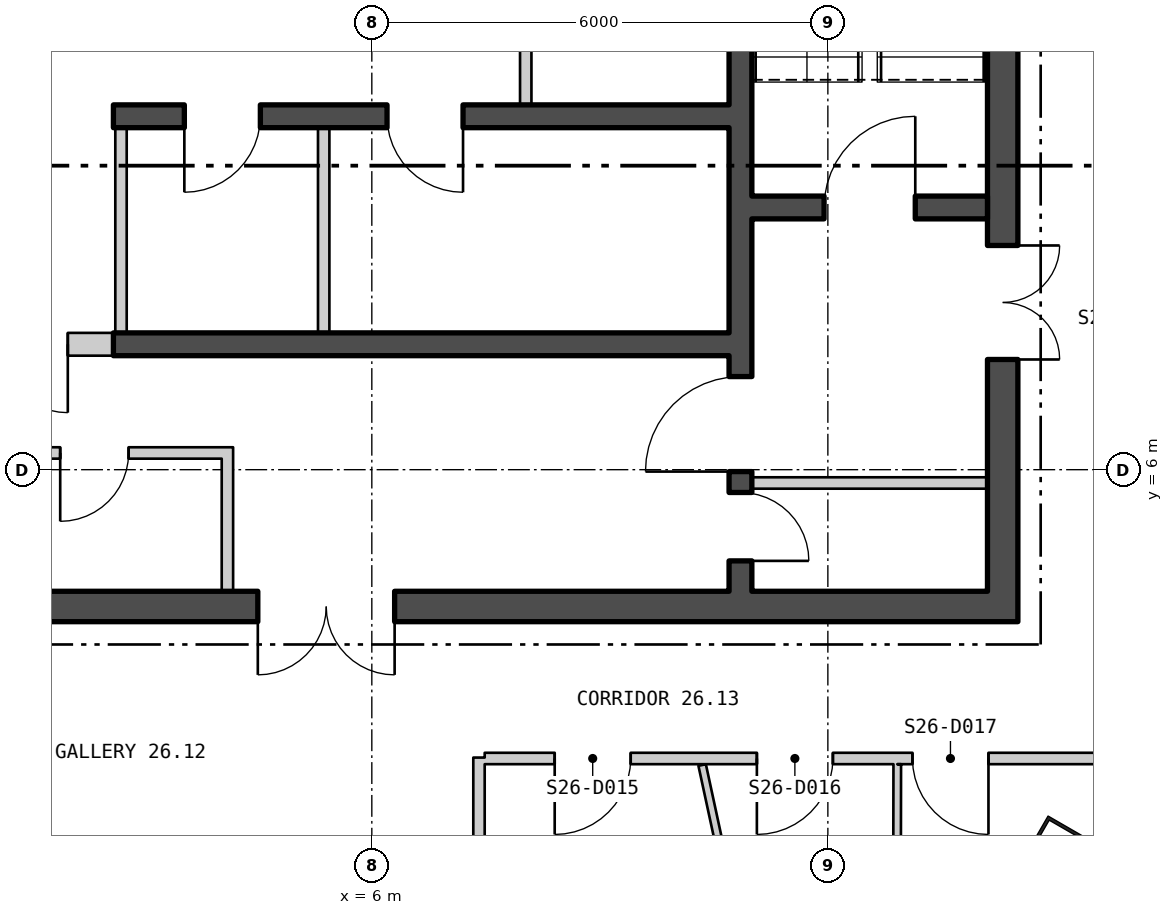
"""IFC4 building model, lengths in metres.
Left out: names, types, materials, properties, quantities, classifications, styles, units other than length and angle.
Written with IfcOpenShell. Run it as: python <this file> out.ifc"""

import sys

from ifc_helpers import new_model, si_unit, direction, frame, frame_2d, origin, origin_2d, place, context, subcontext, project, spatial, polyline, rectangle, hollow_rectangle, outline, extrude, element, fill, save


model = new_model("IFC4")
c1 = context("Model", 3, precision=1e-05, world=origin(), true_north=direction((0.0, 1.0)))
c2 = subcontext(c1, "Body", "Model", "MODEL_VIEW")
j1 = project(units=[si_unit("LENGTHUNIT", "METRE"), si_unit("PLANEANGLEUNIT", "RADIAN")], contexts=[c1])
p1 = place(None, origin())
s1 = spatial("IfcSite", under=j1, at=p1, CompositionType="ELEMENT")
p2 = place(p1, origin())
s2 = spatial("IfcBuilding", under=s1, at=p2, CompositionType="ELEMENT")
p3 = place(p2, frame((0.0, 0.0, 329.4)))
s3 = spatial("IfcBuildingStorey", under=s2, at=p3, CompositionType="ELEMENT", Elevation=329.4)
p4 = place(p3, frame((15.088, 1.073, 0.0), z_axis=(0.0, 0.0, 1.0), x_axis=(0.5, 0.866025403784, 0.0)))
e1 = element("IfcColumn", 1, at=p4, inside=s3, PredefinedType="COLUMN", context=c2, shape_type="SweptSolid", body=[
    extrude(hollow_rectangle(XDim=0.45, YDim=0.7, WallThickness=0.04, at=origin_2d()), origin(), (0.0, 0.0, 1.0), 4.2),
])
p5 = place(p3, frame((1.9, -22.92, -0.18), z_axis=(0.0, 0.0, 1.0), x_axis=(0.500000141277, 0.866025322218, 0.0)))
e2 = element("IfcWall", 2, at=p5, inside=s3, PredefinedType="SOLIDWALL", context=c2, shape_type="SweptSolid", body=[
    extrude(outline(polyline([(-0.13, -0.225), (45.86, -0.225), (45.6, 0.225), (0.13, 0.225), (-0.13, -0.225)])), origin(), (0.0, 0.0, 1.0), 3.98),
])
p6 = place(p5, frame((1.424, 0.0, 1.08)))
e3 = element("IfcOpeningElement", 3, at=p6, cuts=e2, PredefinedType="OPENING", context=c2, shape_type="SweptSolid", body=[
    extrude(rectangle(XDim=2.4, YDim=2.3, at=frame_2d((1.2, 1.15))), frame((0.0, 0.235, 0.0), z_axis=(0.0, -1.0, 0.0), x_axis=(1.0, 0.0, 0.0)), (0.0, 0.0, 1.0), 0.47),
])
p7 = place(p5, frame((5.892, 0.0, 1.08)))
e4 = element("IfcOpeningElement", 4, at=p7, cuts=e2, PredefinedType="OPENING", context=c2, shape_type="SweptSolid", body=[
    extrude(rectangle(XDim=2.4, YDim=2.3, at=frame_2d((1.2, 1.15))), frame((0.0, 0.235, 0.0), z_axis=(0.0, -1.0, 0.0), x_axis=(1.0, 0.0, 0.0)), (0.0, 0.0, 1.0), 0.47),
])
p8 = place(p5, frame((14.905, 0.0, 1.08)))
e5 = element("IfcOpeningElement", 5, at=p8, cuts=e2, PredefinedType="OPENING", context=c2, shape_type="SweptSolid", body=[
    extrude(rectangle(XDim=2.4, YDim=2.3, at=frame_2d((1.2, 1.15))), frame((0.0, 0.235, 0.0), z_axis=(0.0, -1.0, 0.0), x_axis=(1.0, 0.0, 0.0)), (0.0, 0.0, 1.0), 0.47),
])
p9 = place(p5, frame((19.412, 0.0, 1.08)))
e6 = element("IfcOpeningElement", 6, at=p9, cuts=e2, PredefinedType="OPENING", context=c2, shape_type="SweptSolid", body=[
    extrude(rectangle(XDim=2.4, YDim=2.3, at=frame_2d((1.2, 1.15))), frame((0.0, 0.235, 0.0), z_axis=(0.0, -1.0, 0.0), x_axis=(1.0, 0.0, 0.0)), (0.0, 0.0, 1.0), 0.47),
])
p10 = place(p5, frame((23.918, 0.0, 1.08)))
e7 = element("IfcOpeningElement", 7, at=p10, cuts=e2, PredefinedType="OPENING", context=c2, shape_type="SweptSolid", body=[
    extrude(rectangle(XDim=2.4, YDim=2.3, at=frame_2d((1.2, 1.15))), frame((0.0, 0.235, 0.0), z_axis=(0.0, -1.0, 0.0), x_axis=(1.0, 0.0, 0.0)), (0.0, 0.0, 1.0), 0.47),
])
p11 = place(p5, frame((32.932, 0.0, 1.08)))
e8 = element("IfcOpeningElement", 8, at=p11, cuts=e2, PredefinedType="OPENING", context=c2, shape_type="SweptSolid", body=[
    extrude(rectangle(XDim=2.4, YDim=2.3, at=frame_2d((1.2, 1.15))), frame((0.0, 0.235, 0.0), z_axis=(0.0, -1.0, 0.0), x_axis=(1.0, 0.0, 0.0)), (0.0, 0.0, 1.0), 0.47),
])
p12 = place(p5, frame((37.438, 0.0, 1.08)))
e9 = element("IfcOpeningElement", 9, at=p12, cuts=e2, PredefinedType="OPENING", context=c2, shape_type="SweptSolid", body=[
    extrude(rectangle(XDim=2.4, YDim=2.3, at=frame_2d((1.2, 1.15))), frame((0.0, 0.235, 0.0), z_axis=(0.0, -1.0, 0.0), x_axis=(1.0, 0.0, 0.0)), (0.0, 0.0, 1.0), 0.47),
])
p13 = place(p5, frame((41.907, 0.0, 1.08)))
e10 = element("IfcOpeningElement", 10, at=p13, cuts=e2, PredefinedType="OPENING", context=c2, shape_type="SweptSolid", body=[
    extrude(rectangle(XDim=2.4, YDim=2.3, at=frame_2d((1.2, 1.15))), frame((0.0, 0.235, 0.0), z_axis=(0.0, -1.0, 0.0), x_axis=(1.0, 0.0, 0.0)), (0.0, 0.0, 1.0), 0.47),
])
p14 = place(p3, frame((-14.5, 4.2, 0.0), z_axis=(0.0, 0.0, 1.0), x_axis=(1.0, 0.0, 0.0)))
e11 = element("IfcWall", 11, at=p14, inside=s3, PredefinedType="SHEAR", context=c2, shape_type="SweptSolid", body=[
    extrude(rectangle(XDim=29.0, YDim=0.4, at=frame_2d((14.5, 0.0))), origin(), (0.0, 0.0, 1.0), 4.0),
])
p15 = place(p14, frame((9.0, 0.0, 0.0)))
e12 = element("IfcOpeningElement", 12, at=p15, cuts=e11, PredefinedType="OPENING", context=c2, shape_type="SweptSolid", body=[
    extrude(rectangle(XDim=1.8, YDim=2.4, at=frame_2d((0.9, 1.2))), frame((0.0, 0.21, 0.0), z_axis=(0.0, -1.0, 0.0), x_axis=(1.0, 0.0, 0.0)), (0.0, 0.0, 1.0), 0.42),
])
p16 = place(p14, frame((19.0, 0.0, 0.0)))
e13 = element("IfcOpeningElement", 13, at=p16, cuts=e11, PredefinedType="OPENING", context=c2, shape_type="SweptSolid", body=[
    extrude(rectangle(XDim=1.8, YDim=2.4, at=frame_2d((0.9, 1.2))), frame((0.0, 0.21, 0.0), z_axis=(0.0, -1.0, 0.0), x_axis=(1.0, 0.0, 0.0)), (0.0, 0.0, 1.0), 0.42),
])
p17 = place(p3, frame((14.3, 4.4, 0.0), z_axis=(0.0, 0.0, 1.0), x_axis=(0.0, 1.0, 0.0)))
e14 = element("IfcWall", 14, at=p17, inside=s3, PredefinedType="SHEAR", context=c2, shape_type="SweptSolid", body=[
    extrude(rectangle(XDim=13.2, YDim=0.4, at=frame_2d((6.6, 0.0))), origin(), (0.0, 0.0, 1.0), 4.0),
])
p18 = place(p17, frame((3.05, 0.0, 0.0)))
e15 = element("IfcOpeningElement", 15, at=p18, cuts=e14, PredefinedType="OPENING", context=c2, shape_type="SweptSolid", body=[
    extrude(rectangle(XDim=1.5, YDim=2.1, at=frame_2d((0.75, 1.05))), frame((0.0, 0.21, 0.0), z_axis=(0.0, -1.0, 0.0), x_axis=(1.0, 0.0, 0.0)), (0.0, 0.0, 1.0), 0.42),
])
p19 = place(p3, frame((10.85, 4.4, 0.0), z_axis=(0.0, 0.0, 1.0), x_axis=(0.0, 1.0, 0.0)))
e16 = element("IfcWall", 16, at=p19, inside=s3, PredefinedType="SHEAR", context=c2, shape_type="SweptSolid", body=[
    extrude(rectangle(XDim=13.2, YDim=0.3, at=frame_2d((6.6, 0.0))), origin(), (0.0, 0.0, 1.0), 4.0),
])
p20 = place(p19, frame((1.575, 0.0, 0.0)))
e17 = element("IfcOpeningElement", 17, at=p20, cuts=e16, PredefinedType="OPENING", context=c2, shape_type="SweptSolid", body=[
    extrude(rectangle(XDim=1.25, YDim=2.1, at=frame_2d((0.625, 1.05))), frame((0.0, 0.16, 0.0), z_axis=(0.0, -1.0, 0.0), x_axis=(1.0, 0.0, 0.0)), (0.0, 0.0, 1.0), 0.32),
])
p21 = place(p19, frame((0.4, 0.0, 0.0)))
e18 = element("IfcOpeningElement", 18, at=p21, cuts=e16, PredefinedType="OPENING", context=c2, shape_type="SweptSolid", body=[
    extrude(rectangle(XDim=0.9, YDim=2.1, at=frame_2d((0.45, 1.05))), frame((0.0, 0.16, 0.0), z_axis=(0.0, -1.0, 0.0), x_axis=(1.0, 0.0, 0.0)), (0.0, 0.0, 1.0), 0.32),
])
p22 = place(p3, frame((11.0, 9.45, 0.0), z_axis=(0.0, 0.0, 1.0), x_axis=(1.0, 0.0, 0.0)))
e19 = element("IfcWall", 19, at=p22, inside=s3, PredefinedType="SHEAR", context=c2, shape_type="SweptSolid", body=[
    extrude(rectangle(XDim=3.1, YDim=0.3, at=frame_2d((1.55, 0.0))), origin(), (0.0, 0.0, 1.0), 4.0),
])
p23 = place(p22, frame((0.95, 0.0, 0.0)))
e20 = element("IfcOpeningElement", 20, at=p23, cuts=e19, PredefinedType="OPENING", context=c2, shape_type="SweptSolid", body=[
    extrude(rectangle(XDim=1.2, YDim=2.1, at=frame_2d((0.6, 1.05))), frame((0.0, 0.16, 0.0), z_axis=(0.0, -1.0, 0.0), x_axis=(1.0, 0.0, 0.0)), (0.0, 0.0, 1.0), 0.32),
])
p24 = place(p3, frame((2.6, 10.65, 0.0), z_axis=(0.0, 0.0, 1.0), x_axis=(1.0, 0.0, 0.0)))
e21 = element("IfcWall", 21, at=p24, inside=s3, PredefinedType="SHEAR", context=c2, shape_type="SweptSolid", body=[
    extrude(rectangle(XDim=8.1, YDim=0.3, at=frame_2d((4.05, 0.0))), origin(), (0.0, 0.0, 1.0), 4.0),
])
p25 = place(p24, frame((0.933, 0.0, 0.0)))
e22 = element("IfcOpeningElement", 22, at=p25, cuts=e21, PredefinedType="OPENING", context=c2, shape_type="SweptSolid", body=[
    extrude(rectangle(XDim=1.0, YDim=2.1, at=frame_2d((0.5, 1.05))), frame((0.0, 0.16, 0.0), z_axis=(0.0, -1.0, 0.0), x_axis=(1.0, 0.0, 0.0)), (0.0, 0.0, 1.0), 0.32),
])
p26 = place(p24, frame((3.6, 0.0, 0.0)))
e23 = element("IfcOpeningElement", 23, at=p26, cuts=e21, PredefinedType="OPENING", context=c2, shape_type="SweptSolid", body=[
    extrude(rectangle(XDim=1.0, YDim=2.1, at=frame_2d((0.5, 1.05))), frame((0.0, 0.16, 0.0), z_axis=(0.0, -1.0, 0.0), x_axis=(1.0, 0.0, 0.0)), (0.0, 0.0, 1.0), 0.32),
])
p27 = place(p3, frame((2.6, 7.65, 0.0), z_axis=(0.0, 0.0, 1.0), x_axis=(1.0, 0.0, 0.0)))
e24 = element("IfcWall", 24, at=p27, inside=s3, PredefinedType="SHEAR", context=c2, shape_type="SweptSolid", body=[
    extrude(rectangle(XDim=8.1, YDim=0.3, at=frame_2d((4.05, 0.0))), origin(), (0.0, 0.0, 1.0), 4.0),
])
for number, where, z_axis, x_axis in (
    (25, (2.7, 7.8, 0.0), (0.0, 0.0, 1.0), (0.0, 1.0, 0.0)),
    (26, (5.367, 7.8, 0.0), (0.0, 0.0, 1.0), (0.0, 1.0, 0.0)),
):
    element("IfcWall", number, at=place(p3, frame(where, z_axis=z_axis, x_axis=x_axis)), inside=s3, PredefinedType="PARTITIONING", context=c2, shape_type="SweptSolid", body=[
        extrude(rectangle(XDim=2.7, YDim=0.15, at=frame_2d((1.35, 0.0))), origin(), (0.0, 0.0, 1.0), 4.0),
    ])
p28 = place(p3, frame((8.025, 10.8, 0.0), z_axis=(0.0, 0.0, 1.0), x_axis=(0.0, 1.0, 0.0)))
e27 = element("IfcWall", 27, at=p28, inside=s3, PredefinedType="PARTITIONING", context=c2, shape_type="SweptSolid", body=[
    extrude(rectangle(XDim=3.6, YDim=0.15, at=frame_2d((1.8, 0.0))), origin(), (0.0, 0.0, 1.0), 4.0),
])
p29 = place(p28, frame((1.175, 0.0, 0.0)))
e28 = element("IfcOpeningElement", 28, at=p29, cuts=e27, PredefinedType="OPENING", context=c2, shape_type="SweptSolid", body=[
    extrude(rectangle(XDim=1.25, YDim=2.1, at=frame_2d((0.625, 1.05))), frame((0.0, 0.085, 0.0), z_axis=(0.0, -1.0, 0.0), x_axis=(1.0, 0.0, 0.0)), (0.0, 0.0, 1.0), 0.17),
])
p30 = place(p3, frame((11.0, 5.825, 0.0), z_axis=(0.0, 0.0, 1.0), x_axis=(1.0, 0.0, 0.0)))
e29 = element("IfcWall", 29, at=p30, inside=s3, PredefinedType="PARTITIONING", context=c2, shape_type="SweptSolid", body=[
    extrude(rectangle(XDim=3.1, YDim=0.15, at=frame_2d((1.55, 0.0))), origin(), (0.0, 0.0, 1.0), 4.0),
])
p31 = place(p3, frame((4.1, 4.4, 0.0), z_axis=(0.0, 0.0, 1.0), x_axis=(0.0, 1.0, 0.0)))
e30 = element("IfcWall", 30, at=p31, inside=s3, PredefinedType="PARTITIONING", context=c2, shape_type="SweptSolid", body=[
    extrude(rectangle(XDim=1.895, YDim=0.15, at=frame_2d((0.948, 0.0))), origin(), (0.0, 0.0, 1.0), 4.0),
])
p32 = place(p3, frame((0.675, 6.22, 0.0), z_axis=(0.0, 0.0, 1.0), x_axis=(1.0, 0.0, 0.0)))
e31 = element("IfcWall", 31, at=p32, inside=s3, PredefinedType="PARTITIONING", context=c2, shape_type="SweptSolid", body=[
    extrude(rectangle(XDim=3.35, YDim=0.15, at=frame_2d((1.675, 0.0))), origin(), (0.0, 0.0, 1.0), 4.0),
])
p33 = place(p32, frame((1.225, 0.0, 0.0)))
e32 = element("IfcOpeningElement", 32, at=p33, cuts=e31, PredefinedType="OPENING", context=c2, shape_type="SweptSolid", body=[
    extrude(rectangle(XDim=0.9, YDim=2.1, at=frame_2d((0.45, 1.05))), frame((0.0, 0.085, 0.0), z_axis=(0.0, -1.0, 0.0), x_axis=(1.0, 0.0, 0.0)), (0.0, 0.0, 1.0), 0.17),
])
p34 = place(p3, frame((-0.4, 7.65, 0.0), z_axis=(0.0, 0.0, 1.0), x_axis=(1.0, 0.0, 0.0)))
e33 = element("IfcWall", 33, at=p34, inside=s3, PredefinedType="PARTITIONING", context=c2, shape_type="SweptSolid", body=[
    extrude(rectangle(XDim=3.0, YDim=0.3, at=frame_2d((1.5, 0.0))), origin(), (0.0, 0.0, 1.0), 4.0),
])
p35 = place(p34, frame((0.6, 0.0, 0.0)))
e34 = element("IfcOpeningElement", 34, at=p35, cuts=e33, PredefinedType="OPENING", context=c2, shape_type="SweptSolid", body=[
    extrude(rectangle(XDim=1.8, YDim=2.4, at=frame_2d((0.9, 1.2))), frame((0.0, 0.16, 0.0), z_axis=(0.0, -1.0, 0.0), x_axis=(1.0, 0.0, 0.0)), (0.0, 0.0, 1.0), 0.32),
])
p36 = place(p3, frame((7.41, -12.926, 0.0), z_axis=(0.0, 0.0, 1.0), x_axis=(0.0, 1.0, 0.0)))
e35 = element("IfcWall", 35, at=p36, inside=s3, PredefinedType="PARTITIONING", context=c2, shape_type="SweptSolid", body=[
    extrude(rectangle(XDim=15.138, YDim=0.15, at=frame_2d((7.569, 0.0))), origin(), (0.0, 0.0, 1.0), 4.0),
])
p37 = place(p36, frame((3.512, 0.0, 0.0)))
e36 = element("IfcOpeningElement", 36, at=p37, cuts=e35, PredefinedType="OPENING", context=c2, shape_type="SweptSolid", body=[
    extrude(rectangle(XDim=1.0, YDim=2.1, at=frame_2d((0.5, 1.05))), frame((0.0, 0.085, 0.0), z_axis=(0.0, -1.0, 0.0), x_axis=(1.0, 0.0, 0.0)), (0.0, 0.0, 1.0), 0.17),
])
p38 = place(p36, frame((11.427, 0.0, 0.0)))
e37 = element("IfcOpeningElement", 37, at=p38, cuts=e35, PredefinedType="OPENING", context=c2, shape_type="SweptSolid", body=[
    extrude(rectangle(XDim=1.0, YDim=2.1, at=frame_2d((0.5, 1.05))), frame((0.0, 0.085, 0.0), z_axis=(0.0, -1.0, 0.0), x_axis=(1.0, 0.0, 0.0)), (0.0, 0.0, 1.0), 0.17),
])
p39 = place(p3, frame((7.485, 2.2, 0.0), z_axis=(0.0, 0.0, 1.0), x_axis=(1.0, 0.0, 0.0)))
e38 = element("IfcWall", 38, at=p39, inside=s3, PredefinedType="PARTITIONING", context=c2, shape_type="SweptSolid", body=[
    extrude(rectangle(XDim=8.658, YDim=0.15, at=frame_2d((4.329, 0.0))), origin(), (0.0, 0.0, 1.0), 4.0),
])
p40 = place(p39, frame((0.921, 0.0, 0.0)))
e39 = element("IfcOpeningElement", 39, at=p40, cuts=e38, PredefinedType="OPENING", context=c2, shape_type="SweptSolid", body=[
    extrude(rectangle(XDim=1.0, YDim=2.1, at=frame_2d((0.5, 1.05))), frame((0.0, 0.085, 0.0), z_axis=(0.0, -1.0, 0.0), x_axis=(1.0, 0.0, 0.0)), (0.0, 0.0, 1.0), 0.17),
])
p41 = place(p39, frame((3.581, 0.0, 0.0)))
e40 = element("IfcOpeningElement", 40, at=p41, cuts=e38, PredefinedType="OPENING", context=c2, shape_type="SweptSolid", body=[
    extrude(rectangle(XDim=1.0, YDim=2.1, at=frame_2d((0.5, 1.05))), frame((0.0, 0.085, 0.0), z_axis=(0.0, -1.0, 0.0), x_axis=(1.0, 0.0, 0.0)), (0.0, 0.0, 1.0), 0.17),
])
p42 = place(p39, frame((5.628, 0.0, 0.0)))
e41 = element("IfcOpeningElement", 41, at=p42, cuts=e38, PredefinedType="OPENING", context=c2, shape_type="SweptSolid", body=[
    extrude(rectangle(XDim=1.0, YDim=2.1, at=frame_2d((0.5, 1.05))), frame((0.0, 0.085, 0.0), z_axis=(0.0, -1.0, 0.0), x_axis=(1.0, 0.0, 0.0)), (0.0, 0.0, 1.0), 0.17),
])
p43 = place(p3, frame((10.346, 2.114, 0.0), z_axis=(0.0, 0.0, 1.0), x_axis=(0.211378111895, -0.977404365558, 0.0)))
e42 = element("IfcWall", 42, at=p43, inside=s3, PredefinedType="PARTITIONING", context=c2, shape_type="SweptSolid", body=[
    extrude(rectangle(XDim=3.988, YDim=0.1, at=frame_2d((1.994, 0.0))), origin(), (0.0, 0.0, 1.0), 4.0),
])
p44 = place(p3, frame((12.904, -2.73, 0.0), z_axis=(0.0, 0.0, 1.0), x_axis=(0.001853755826, 0.999998281793, 0.0)))
e43 = element("IfcWall", 43, at=p44, inside=s3, PredefinedType="PARTITIONING", context=c2, shape_type="SweptSolid", body=[
    extrude(rectangle(XDim=4.855, YDim=0.1, at=frame_2d((2.428, 0.0))), origin(), (0.0, 0.0, 1.0), 4.0),
])
p45 = place(p25, origin())
e44 = element("IfcDoor", 44, at=p45, inside=s3, OperationType="SINGLE_SWING_LEFT", PredefinedType="DOOR", context=c2, shape_type="SweptSolid", body=[
    extrude(rectangle(XDim=1.0, YDim=2.1, at=frame_2d((0.5, 1.05))), frame((0.0, 0.025, 0.0), z_axis=(0.0, -1.0, 0.0), x_axis=(1.0, 0.0, 0.0)), (0.0, 0.0, 1.0), 0.05),
])
fill(e22, e44)
p46 = place(p26, origin())
e45 = element("IfcDoor", 45, at=p46, inside=s3, OperationType="SINGLE_SWING_RIGHT", PredefinedType="DOOR", context=c2, shape_type="SweptSolid", body=[
    extrude(rectangle(XDim=1.0, YDim=2.1, at=frame_2d((0.5, 1.05))), frame((0.0, 0.025, 0.0), z_axis=(0.0, -1.0, 0.0), x_axis=(1.0, 0.0, 0.0)), (0.0, 0.0, 1.0), 0.05),
])
fill(e23, e45)
p47 = place(p23, origin())
e46 = element("IfcDoor", 46, at=p47, inside=s3, OperationType="SINGLE_SWING_LEFT", PredefinedType="DOOR", context=c2, shape_type="SweptSolid", body=[
    extrude(rectangle(XDim=1.2, YDim=2.1, at=frame_2d((0.6, 1.05))), frame((0.0, 0.025, 0.0), z_axis=(0.0, -1.0, 0.0), x_axis=(1.0, 0.0, 0.0)), (0.0, 0.0, 1.0), 0.05),
])
fill(e20, e46)
p48 = place(p20, origin())
e47 = element("IfcDoor", 47, at=p48, inside=s3, OperationType="SINGLE_SWING_RIGHT", PredefinedType="DOOR", context=c2, shape_type="SweptSolid", body=[
    extrude(rectangle(XDim=1.25, YDim=2.1, at=frame_2d((0.625, 1.05))), frame((0.0, 0.025, 0.0), z_axis=(0.0, -1.0, 0.0), x_axis=(1.0, 0.0, 0.0)), (0.0, 0.0, 1.0), 0.05),
])
fill(e17, e47)
p49 = place(p18, origin())
e48 = element("IfcDoor", 48, at=p49, inside=s3, OperationType="DOUBLE_DOOR_SINGLE_SWING", PredefinedType="DOOR", context=c2, shape_type="SweptSolid", body=[
    extrude(rectangle(XDim=1.5, YDim=2.1, at=frame_2d((0.75, 1.05))), frame((0.0, 0.025, 0.0), z_axis=(0.0, -1.0, 0.0), x_axis=(1.0, 0.0, 0.0)), (0.0, 0.0, 1.0), 0.05),
])
fill(e15, e48)
p50 = place(p21, origin())
e49 = element("IfcDoor", 49, at=p50, inside=s3, OperationType="SINGLE_SWING_LEFT", PredefinedType="DOOR", context=c2, shape_type="SweptSolid", body=[
    extrude(rectangle(XDim=0.9, YDim=2.1, at=frame_2d((0.45, 1.05))), frame((0.0, 0.025, 0.0), z_axis=(0.0, -1.0, 0.0), x_axis=(1.0, 0.0, 0.0)), (0.0, 0.0, 1.0), 0.05),
])
fill(e18, e49)
p51 = place(p33, origin())
e50 = element("IfcDoor", 50, at=p51, inside=s3, OperationType="SINGLE_SWING_LEFT", PredefinedType="DOOR", context=c2, shape_type="SweptSolid", body=[
    extrude(rectangle(XDim=0.9, YDim=2.1, at=frame_2d((0.45, 1.05))), frame((0.0, 0.025, 0.0), z_axis=(0.0, -1.0, 0.0), x_axis=(1.0, 0.0, 0.0)), (0.0, 0.0, 1.0), 0.05),
])
fill(e32, e50)
p52 = place(p35, origin())
e51 = element("IfcDoor", 51, at=p52, inside=s3, OperationType="DOUBLE_DOOR_SINGLE_SWING", PredefinedType="DOOR", context=c2, shape_type="SweptSolid", body=[
    extrude(rectangle(XDim=1.8, YDim=2.4, at=frame_2d((0.9, 1.2))), frame((0.0, 0.025, 0.0), z_axis=(0.0, -1.0, 0.0), x_axis=(1.0, 0.0, 0.0)), (0.0, 0.0, 1.0), 0.05),
])
fill(e34, e51)
p53 = place(p16, origin())
e52 = element("IfcDoor", 52, at=p53, inside=s3, OperationType="DOUBLE_DOOR_SINGLE_SWING", PredefinedType="DOOR", context=c2, shape_type="SweptSolid", body=[
    extrude(rectangle(XDim=1.8, YDim=2.4, at=frame_2d((0.9, 1.2))), frame((0.0, 0.025, 0.0), z_axis=(0.0, -1.0, 0.0), x_axis=(1.0, 0.0, 0.0)), (0.0, 0.0, 1.0), 0.05),
])
fill(e13, e52)
p54 = place(p40, origin())
e53 = element("IfcDoor", 53, at=p54, inside=s3, OperationType="SINGLE_SWING_LEFT", PredefinedType="DOOR", context=c2, shape_type="SweptSolid", body=[
    extrude(rectangle(XDim=1.0, YDim=2.1, at=frame_2d((0.5, 1.05))), frame((0.0, 0.025, 0.0), z_axis=(0.0, -1.0, 0.0), x_axis=(1.0, 0.0, 0.0)), (0.0, 0.0, 1.0), 0.05),
])
fill(e39, e53)
p55 = place(p41, origin())
e54 = element("IfcDoor", 54, at=p55, inside=s3, OperationType="SINGLE_SWING_LEFT", PredefinedType="DOOR", context=c2, shape_type="SweptSolid", body=[
    extrude(rectangle(XDim=1.0, YDim=2.1, at=frame_2d((0.5, 1.05))), frame((0.0, 0.025, 0.0), z_axis=(0.0, -1.0, 0.0), x_axis=(1.0, 0.0, 0.0)), (0.0, 0.0, 1.0), 0.05),
])
fill(e40, e54)
p56 = place(p42, origin())
e55 = element("IfcDoor", 55, at=p56, inside=s3, OperationType="SINGLE_SWING_RIGHT", PredefinedType="DOOR", context=c2, shape_type="SweptSolid", body=[
    extrude(rectangle(XDim=1.0, YDim=2.1, at=frame_2d((0.5, 1.05))), frame((0.0, 0.025, 0.0), z_axis=(0.0, -1.0, 0.0), x_axis=(1.0, 0.0, 0.0)), (0.0, 0.0, 1.0), 0.05),
])
fill(e41, e55)
save(model, sys.argv[1])
